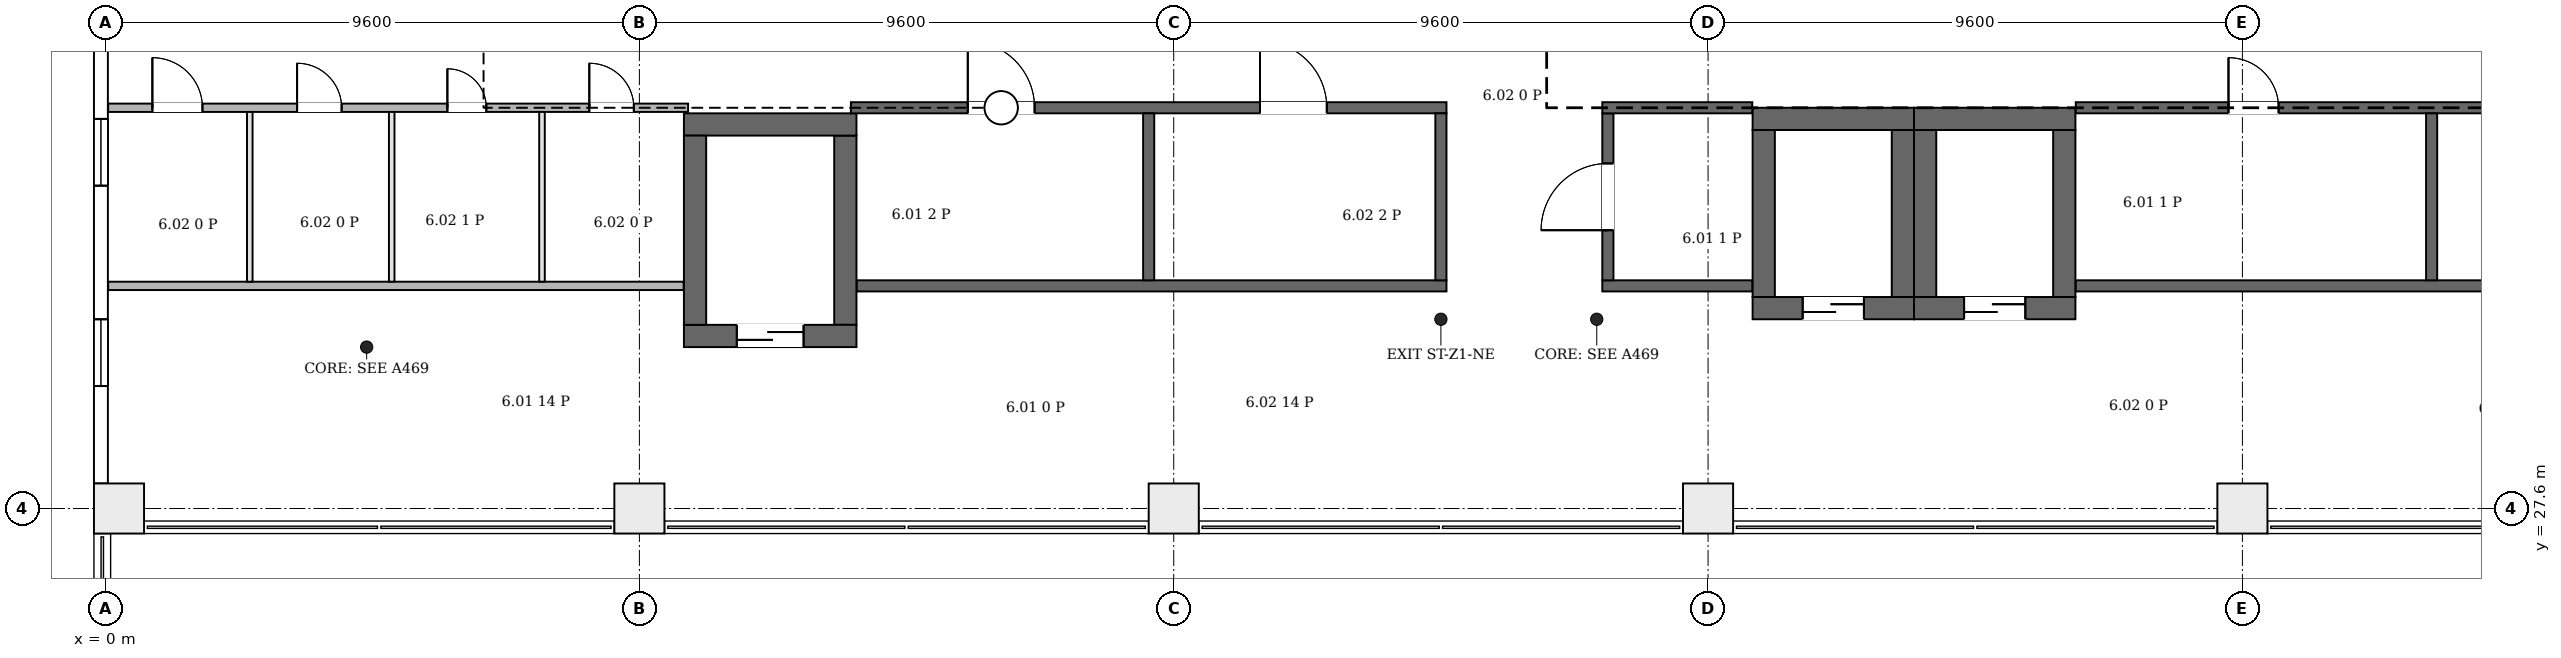
"""IFC4 building model, lengths in metres.
Left out: names, types, materials, properties, quantities, classifications, styles, units other than length and angle.
Written with IfcOpenShell. Run it as: python <this file> out.ifc"""

import sys

from ifc_helpers import new_model, si_unit, direction, frame, frame_2d, origin, origin_2d, place, context, subcontext, project, spatial, rectangle, extrude, element, fill, save


model = new_model("IFC4")
c1 = context("Model", 3, precision=1e-05, world=origin(), true_north=direction((0.0, 1.0)))
c2 = subcontext(c1, "Body", "Model", "MODEL_VIEW")
j1 = project(units=[si_unit("LENGTHUNIT", "METRE"), si_unit("PLANEANGLEUNIT", "RADIAN")], contexts=[c1])
p1 = place(None, origin())
s1 = spatial("IfcSite", under=j1, at=p1, CompositionType="ELEMENT")
p2 = place(p1, origin())
s2 = spatial("IfcBuilding", under=s1, at=p2, CompositionType="ELEMENT")
p3 = place(p2, frame((0.0, 0.0, 36.1)))
s3 = spatial("IfcBuildingStorey", under=s2, at=p3, CompositionType="ELEMENT", Elevation=36.1)
p4 = place(p3, frame((10.4, 30.7, 0.0), z_axis=(0.0, 0.0, 1.0), x_axis=(1.0, 0.0, 0.0)))
e1 = element("IfcWall", 1, at=p4, inside=s3, PredefinedType="SHEAR", context=c2, shape_type="SweptSolid", body=[
    extrude(rectangle(XDim=3.1, YDim=0.4, at=frame_2d((1.55, 0.0))), origin(), (0.0, 0.0, 1.0), 4.2),
])
p5 = place(p4, frame((0.95, 0.0, 0.0)))
e2 = element("IfcOpeningElement", 2, at=p5, cuts=e1, PredefinedType="OPENING", context=c2, shape_type="SweptSolid", body=[
    extrude(rectangle(XDim=1.2, YDim=2.1, at=frame_2d((0.6, 1.05))), frame((0.0, 0.21, 0.0), z_axis=(0.0, -1.0, 0.0), x_axis=(1.0, 0.0, 0.0)), (0.0, 0.0, 1.0), 0.42),
])
p6 = place(p3, frame((10.4, 34.5, 0.0), z_axis=(0.0, 0.0, 1.0), x_axis=(1.0, 0.0, 0.0)))
e3 = element("IfcWall", 3, at=p6, inside=s3, PredefinedType="SHEAR", context=c2, shape_type="SweptSolid", body=[
    extrude(rectangle(XDim=3.1, YDim=0.4, at=frame_2d((1.55, 0.0))), origin(), (0.0, 0.0, 1.0), 4.2),
])
for number, where, z_axis, x_axis in (
    (4, (10.6, 30.9, 0.0), (0.0, 0.0, 1.0), (0.0, 1.0, 0.0)),
    (5, (13.3, 30.9, 0.0), (0.0, 0.0, 1.0), (0.0, 1.0, 0.0)),
):
    element("IfcWall", number, at=place(p3, frame(where, z_axis=z_axis, x_axis=x_axis)), inside=s3, PredefinedType="SHEAR", context=c2, shape_type="SweptSolid", body=[
        extrude(rectangle(XDim=3.4, YDim=0.4, at=frame_2d((1.7, 0.0))), origin(), (0.0, 0.0, 1.0), 4.2),
    ])
p7 = place(p3, frame((29.6, 31.2, 0.0), z_axis=(0.0, 0.0, 1.0), x_axis=(1.0, 0.0, 0.0)))
e6 = element("IfcWall", 6, at=p7, inside=s3, PredefinedType="SHEAR", context=c2, shape_type="SweptSolid", body=[
    extrude(rectangle(XDim=2.9, YDim=0.4, at=frame_2d((1.45, 0.0))), origin(), (0.0, 0.0, 1.0), 4.2),
])
p8 = place(p7, frame((0.9, 0.0, 0.0)))
e7 = element("IfcOpeningElement", 7, at=p8, cuts=e6, PredefinedType="OPENING", context=c2, shape_type="SweptSolid", body=[
    extrude(rectangle(XDim=1.1, YDim=2.1, at=frame_2d((0.55, 1.05))), frame((0.0, 0.21, 0.0), z_axis=(0.0, -1.0, 0.0), x_axis=(1.0, 0.0, 0.0)), (0.0, 0.0, 1.0), 0.42),
])
p9 = place(p3, frame((29.6, 34.6, 0.0), z_axis=(0.0, 0.0, 1.0), x_axis=(1.0, 0.0, 0.0)))
e8 = element("IfcWall", 8, at=p9, inside=s3, PredefinedType="SHEAR", context=c2, shape_type="SweptSolid", body=[
    extrude(rectangle(XDim=2.9, YDim=0.4, at=frame_2d((1.45, 0.0))), origin(), (0.0, 0.0, 1.0), 4.2),
])
for number, where, z_axis, x_axis in (
    (9, (29.8, 31.4, 0.0), (0.0, 0.0, 1.0), (0.0, 1.0, 0.0)),
    (10, (32.3, 31.4, 0.0), (0.0, 0.0, 1.0), (0.0, 1.0, 0.0)),
):
    element("IfcWall", number, at=place(p3, frame(where, z_axis=z_axis, x_axis=x_axis)), inside=s3, PredefinedType="SHEAR", context=c2, shape_type="SweptSolid", body=[
        extrude(rectangle(XDim=3.0, YDim=0.4, at=frame_2d((1.5, 0.0))), origin(), (0.0, 0.0, 1.0), 4.2),
    ])
p10 = place(p3, frame((32.5, 31.2, 0.0), z_axis=(0.0, 0.0, 1.0), x_axis=(1.0, 0.0, 0.0)))
e11 = element("IfcWall", 11, at=p10, inside=s3, PredefinedType="SHEAR", context=c2, shape_type="SweptSolid", body=[
    extrude(rectangle(XDim=2.9, YDim=0.4, at=frame_2d((1.45, 0.0))), origin(), (0.0, 0.0, 1.0), 4.2),
])
p11 = place(p10, frame((0.9, 0.0, 0.0)))
e12 = element("IfcOpeningElement", 12, at=p11, cuts=e11, PredefinedType="OPENING", context=c2, shape_type="SweptSolid", body=[
    extrude(rectangle(XDim=1.1, YDim=2.1, at=frame_2d((0.55, 1.05))), frame((0.0, 0.21, 0.0), z_axis=(0.0, -1.0, 0.0), x_axis=(1.0, 0.0, 0.0)), (0.0, 0.0, 1.0), 0.42),
])
p12 = place(p3, frame((32.5, 34.6, 0.0), z_axis=(0.0, 0.0, 1.0), x_axis=(1.0, 0.0, 0.0)))
e13 = element("IfcWall", 13, at=p12, inside=s3, PredefinedType="SHEAR", context=c2, shape_type="SweptSolid", body=[
    extrude(rectangle(XDim=2.9, YDim=0.4, at=frame_2d((1.45, 0.0))), origin(), (0.0, 0.0, 1.0), 4.2),
])
for number, where, z_axis, x_axis in (
    (14, (32.7, 31.4, 0.0), (0.0, 0.0, 1.0), (0.0, 1.0, 0.0)),
    (15, (35.2, 31.4, 0.0), (0.0, 0.0, 1.0), (0.0, 1.0, 0.0)),
):
    element("IfcWall", number, at=place(p3, frame(where, z_axis=z_axis, x_axis=x_axis)), inside=s3, PredefinedType="SHEAR", context=c2, shape_type="SweptSolid", body=[
        extrude(rectangle(XDim=3.0, YDim=0.4, at=frame_2d((1.5, 0.0))), origin(), (0.0, 0.0, 1.0), 4.2),
    ])
for number, where, z_axis, x_axis in (
    (16, (0.25, 27.6, 0.0), (0.0, 0.0, 1.0), (1.0, 0.0, 0.0)),
    (17, (9.6, 27.6, 0.0), (0.0, 0.0, 1.0), (1.0, 0.0, 0.0)),
    (18, (19.2, 27.6, 0.0), (0.0, 0.0, 1.0), (1.0, 0.0, 0.0)),
    (19, (28.8, 27.6, 0.0), (0.0, 0.0, 1.0), (1.0, 0.0, 0.0)),
    (20, (38.4, 27.6, 0.0), (0.0, 0.0, 1.0), (1.0, 0.0, 0.0)),
):
    element("IfcColumn", number, at=place(p3, frame(where, z_axis=z_axis, x_axis=x_axis)), inside=s3, PredefinedType="COLUMN", context=c2, shape_type="SweptSolid", body=[
        extrude(rectangle(XDim=0.9, YDim=0.9, at=origin_2d()), origin(), (0.0, 0.0, 1.0), 4.2),
    ])
p13 = place(p3, frame((-0.074, 36.35, 0.0), z_axis=(0.0, 0.0, 1.0), x_axis=(0.0, -1.0, 0.0)))
e21 = element("IfcWall", 21, at=p13, inside=s3, PredefinedType="ELEMENTEDWALL", context=c2, shape_type="SweptSolid", body=[
    extrude(rectangle(XDim=8.3, YDim=0.25, at=frame_2d((4.15, 0.0))), origin(), (0.0, 0.0, 1.0), 3.9),
])
p14 = place(p13, frame((5.35, 0.0, 0.9)))
e22 = element("IfcOpeningElement", 22, at=p14, cuts=e21, PredefinedType="OPENING", context=c2, shape_type="SweptSolid", body=[
    extrude(rectangle(XDim=1.2, YDim=2.6, at=frame_2d((0.6, 1.3))), frame((0.0, 0.135, 0.0), z_axis=(0.0, -1.0, 0.0), x_axis=(1.0, 0.0, 0.0)), (0.0, 0.0, 1.0), 0.27),
])
p15 = place(p13, frame((1.75, 0.0, 0.9)))
e23 = element("IfcOpeningElement", 23, at=p15, cuts=e21, PredefinedType="OPENING", context=c2, shape_type="SweptSolid", body=[
    extrude(rectangle(XDim=1.2, YDim=2.6, at=frame_2d((0.6, 1.3))), frame((0.0, 0.135, 0.0), z_axis=(0.0, -1.0, 0.0), x_axis=(1.0, 0.0, 0.0)), (0.0, 0.0, 1.0), 0.27),
])
p16 = place(p3, frame((0.056, 31.6, 0.0), z_axis=(0.0, 0.0, 1.0), x_axis=(1.0, 0.0, 0.0)))
e24 = element("IfcWall", 24, at=p16, inside=s3, PredefinedType="PARTITIONING", context=c2, shape_type="SweptSolid", body=[
    extrude(rectangle(XDim=10.338, YDim=0.15, at=frame_2d((5.169, 0.0))), origin(), (0.0, 0.0, 1.0), 3.9),
])
p17 = place(p3, frame((0.056, 34.8, 0.0), z_axis=(0.0, 0.0, 1.0), x_axis=(1.0, 0.0, 0.0)))
e25 = element("IfcWall", 25, at=p17, inside=s3, PredefinedType="PARTITIONING", context=c2, shape_type="SweptSolid", body=[
    extrude(rectangle(XDim=10.419, YDim=0.15, at=frame_2d((5.209, 0.0))), origin(), (0.0, 0.0, 1.0), 3.9),
])
p18 = place(p17, frame((0.794, 0.0, 0.0)))
e26 = element("IfcOpeningElement", 26, at=p18, cuts=e25, PredefinedType="OPENING", context=c2, shape_type="SweptSolid", body=[
    extrude(rectangle(XDim=0.9, YDim=2.1, at=frame_2d((0.45, 1.05))), frame((0.0, 0.085, 0.0), z_axis=(0.0, -1.0, 0.0), x_axis=(1.0, 0.0, 0.0)), (0.0, 0.0, 1.0), 0.17),
])
p19 = place(p17, frame((3.394, 0.0, 0.0)))
e27 = element("IfcOpeningElement", 27, at=p19, cuts=e25, PredefinedType="OPENING", context=c2, shape_type="SweptSolid", body=[
    extrude(rectangle(XDim=0.8, YDim=2.1, at=frame_2d((0.4, 1.05))), frame((0.0, 0.085, 0.0), z_axis=(0.0, -1.0, 0.0), x_axis=(1.0, 0.0, 0.0)), (0.0, 0.0, 1.0), 0.17),
])
p20 = place(p17, frame((6.094, 0.0, 0.0)))
e28 = element("IfcOpeningElement", 28, at=p20, cuts=e25, PredefinedType="OPENING", context=c2, shape_type="SweptSolid", body=[
    extrude(rectangle(XDim=0.7, YDim=2.1, at=frame_2d((0.35, 1.05))), frame((0.0, 0.085, 0.0), z_axis=(0.0, -1.0, 0.0), x_axis=(1.0, 0.0, 0.0)), (0.0, 0.0, 1.0), 0.17),
])
p21 = place(p17, frame((8.644, 0.0, 0.0)))
e29 = element("IfcOpeningElement", 29, at=p21, cuts=e25, PredefinedType="OPENING", context=c2, shape_type="SweptSolid", body=[
    extrude(rectangle(XDim=0.8, YDim=2.1, at=frame_2d((0.4, 1.05))), frame((0.0, 0.085, 0.0), z_axis=(0.0, -1.0, 0.0), x_axis=(1.0, 0.0, 0.0)), (0.0, 0.0, 1.0), 0.17),
])
for number, where, z_axis, x_axis in (
    (30, (2.6, 31.675, 0.0), (0.0, 0.0, 1.0), (0.0, 1.0, 0.0)),
    (31, (5.15, 31.675, 0.0), (0.0, 0.0, 1.0), (0.0, 1.0, 0.0)),
    (32, (7.85, 31.675, 0.0), (0.0, 0.0, 1.0), (0.0, 1.0, 0.0)),
):
    element("IfcWall", number, at=place(p3, frame(where, z_axis=z_axis, x_axis=x_axis)), inside=s3, PredefinedType="PARTITIONING", context=c2, shape_type="SweptSolid", body=[
        extrude(rectangle(XDim=3.05, YDim=0.1, at=frame_2d((1.525, 0.0))), origin(), (0.0, 0.0, 1.0), 3.9),
    ])
p22 = place(p3, frame((13.4, 34.8, 0.0), z_axis=(0.0, 0.0, 1.0), x_axis=(1.0, 0.0, 0.0)))
e33 = element("IfcWall", 33, at=p22, inside=s3, PredefinedType="PARTITIONING", context=c2, shape_type="SweptSolid", body=[
    extrude(rectangle(XDim=10.7, YDim=0.2, at=frame_2d((5.35, 0.0))), origin(), (0.0, 0.0, 1.0), 3.9),
])
p23 = place(p22, frame((2.1, 0.0, 0.0)))
e34 = element("IfcOpeningElement", 34, at=p23, cuts=e33, PredefinedType="OPENING", context=c2, shape_type="SweptSolid", body=[
    extrude(rectangle(XDim=1.2, YDim=2.1, at=frame_2d((0.6, 1.05))), frame((0.0, 0.11, 0.0), z_axis=(0.0, -1.0, 0.0), x_axis=(1.0, 0.0, 0.0)), (0.0, 0.0, 1.0), 0.22),
])
p24 = place(p22, frame((7.35, 0.0, 0.0)))
e35 = element("IfcOpeningElement", 35, at=p24, cuts=e33, PredefinedType="OPENING", context=c2, shape_type="SweptSolid", body=[
    extrude(rectangle(XDim=1.2, YDim=2.1, at=frame_2d((0.6, 1.05))), frame((0.0, 0.11, 0.0), z_axis=(0.0, -1.0, 0.0), x_axis=(1.0, 0.0, 0.0)), (0.0, 0.0, 1.0), 0.22),
])
p25 = place(p3, frame((13.506, 31.6, 0.0), z_axis=(0.0, 0.0, 1.0), x_axis=(1.0, 0.0, 0.0)))
e36 = element("IfcWall", 36, at=p25, inside=s3, PredefinedType="PARTITIONING", context=c2, shape_type="SweptSolid", body=[
    extrude(rectangle(XDim=10.594, YDim=0.2, at=frame_2d((5.297, 0.0))), origin(), (0.0, 0.0, 1.0), 3.9),
])
for number, where, z_axis, x_axis in (
    (37, (18.75, 31.7, 0.0), (0.0, 0.0, 1.0), (0.0, 1.0, 0.0)),
    (38, (24.0, 31.7, 0.0), (0.0, 0.0, 1.0), (0.0, 1.0, 0.0)),
):
    element("IfcWall", number, at=place(p3, frame(where, z_axis=z_axis, x_axis=x_axis)), inside=s3, PredefinedType="PARTITIONING", context=c2, shape_type="SweptSolid", body=[
        extrude(rectangle(XDim=3.0, YDim=0.2, at=frame_2d((1.5, 0.0))), origin(), (0.0, 0.0, 1.0), 3.9),
    ])
p26 = place(p3, frame((26.9, 31.6, 0.0), z_axis=(0.0, 0.0, 1.0), x_axis=(1.0, 0.0, 0.0)))
e39 = element("IfcWall", 39, at=p26, inside=s3, PredefinedType="PARTITIONING", context=c2, shape_type="SweptSolid", body=[
    extrude(rectangle(XDim=2.694, YDim=0.2, at=frame_2d((1.347, 0.0))), origin(), (0.0, 0.0, 1.0), 3.9),
])
p27 = place(p3, frame((27.0, 31.7, 0.0), z_axis=(0.0, 0.0, 1.0), x_axis=(0.0, 1.0, 0.0)))
e40 = element("IfcWall", 40, at=p27, inside=s3, PredefinedType="PARTITIONING", context=c2, shape_type="SweptSolid", body=[
    extrude(rectangle(XDim=3.0, YDim=0.2, at=frame_2d((1.5, 0.0))), origin(), (0.0, 0.0, 1.0), 3.9),
])
p28 = place(p27, frame((0.9, 0.0, 0.0)))
e41 = element("IfcOpeningElement", 41, at=p28, cuts=e40, PredefinedType="OPENING", context=c2, shape_type="SweptSolid", body=[
    extrude(rectangle(XDim=1.2, YDim=2.1, at=frame_2d((0.6, 1.05))), frame((0.0, 0.11, 0.0), z_axis=(0.0, -1.0, 0.0), x_axis=(1.0, 0.0, 0.0)), (0.0, 0.0, 1.0), 0.22),
])
p29 = place(p3, frame((26.9, 34.8, 0.0), z_axis=(0.0, 0.0, 1.0), x_axis=(1.0, 0.0, 0.0)))
e42 = element("IfcWall", 42, at=p29, inside=s3, PredefinedType="PARTITIONING", context=c2, shape_type="SweptSolid", body=[
    extrude(rectangle(XDim=2.694, YDim=0.2, at=frame_2d((1.347, 0.0))), origin(), (0.0, 0.0, 1.0), 3.9),
])
p30 = place(p3, frame((35.406, 31.6, 0.0), z_axis=(0.0, 0.0, 1.0), x_axis=(1.0, 0.0, 0.0)))
e43 = element("IfcWall", 43, at=p30, inside=s3, PredefinedType="PARTITIONING", context=c2, shape_type="SweptSolid", body=[
    extrude(rectangle(XDim=12.788, YDim=0.2, at=frame_2d((6.394, 0.0))), origin(), (0.0, 0.0, 1.0), 3.9),
])
p31 = place(p3, frame((35.406, 34.8, 0.0), z_axis=(0.0, 0.0, 1.0), x_axis=(1.0, 0.0, 0.0)))
e44 = element("IfcWall", 44, at=p31, inside=s3, PredefinedType="PARTITIONING", context=c2, shape_type="SweptSolid", body=[
    extrude(rectangle(XDim=12.788, YDim=0.2, at=frame_2d((6.394, 0.0))), origin(), (0.0, 0.0, 1.0), 3.9),
])
p32 = place(p31, frame((2.744, 0.0, 0.0)))
e45 = element("IfcOpeningElement", 45, at=p32, cuts=e44, PredefinedType="OPENING", context=c2, shape_type="SweptSolid", body=[
    extrude(rectangle(XDim=0.9, YDim=2.1, at=frame_2d((0.45, 1.05))), frame((0.0, 0.11, 0.0), z_axis=(0.0, -1.0, 0.0), x_axis=(1.0, 0.0, 0.0)), (0.0, 0.0, 1.0), 0.22),
])
p33 = place(p31, frame((9.144, 0.0, 0.0)))
e46 = element("IfcOpeningElement", 46, at=p33, cuts=e44, PredefinedType="OPENING", context=c2, shape_type="SweptSolid", body=[
    extrude(rectangle(XDim=0.9, YDim=2.1, at=frame_2d((0.45, 1.05))), frame((0.0, 0.11, 0.0), z_axis=(0.0, -1.0, 0.0), x_axis=(1.0, 0.0, 0.0)), (0.0, 0.0, 1.0), 0.22),
])
p34 = place(p3, frame((41.8, 31.7, 0.0), z_axis=(0.0, 0.0, 1.0), x_axis=(0.0, 1.0, 0.0)))
e47 = element("IfcWall", 47, at=p34, inside=s3, PredefinedType="PARTITIONING", context=c2, shape_type="SweptSolid", body=[
    extrude(rectangle(XDim=3.0, YDim=0.2, at=frame_2d((1.5, 0.0))), origin(), (0.0, 0.0, 1.0), 3.9),
])
p35 = place(p14, origin())
e48 = element("IfcWindow", 48, at=p35, inside=s3, PartitioningType="SINGLE_PANEL", PredefinedType="WINDOW", context=c2, shape_type="SweptSolid", body=[
    extrude(rectangle(XDim=1.2, YDim=2.6, at=frame_2d((0.6, 1.3))), frame((0.0, 0.03, 0.0), z_axis=(0.0, -1.0, 0.0), x_axis=(1.0, 0.0, 0.0)), (0.0, 0.0, 1.0), 0.06),
])
fill(e22, e48)
p36 = place(p15, origin())
e49 = element("IfcWindow", 49, at=p36, inside=s3, PartitioningType="SINGLE_PANEL", PredefinedType="WINDOW", context=c2, shape_type="SweptSolid", body=[
    extrude(rectangle(XDim=1.2, YDim=2.6, at=frame_2d((0.6, 1.3))), frame((0.0, 0.03, 0.0), z_axis=(0.0, -1.0, 0.0), x_axis=(1.0, 0.0, 0.0)), (0.0, 0.0, 1.0), 0.06),
])
fill(e23, e49)
p37 = place(p5, origin())
e50 = element("IfcDoor", 50, at=p37, inside=s3, OperationType="DOUBLE_DOOR_SLIDING", PredefinedType="DOOR", context=c2, shape_type="SweptSolid", body=[
    extrude(rectangle(XDim=1.2, YDim=2.1, at=frame_2d((0.6, 1.05))), frame((0.0, 0.025, 0.0), z_axis=(0.0, -1.0, 0.0), x_axis=(1.0, 0.0, 0.0)), (0.0, 0.0, 1.0), 0.05),
])
fill(e2, e50)
p38 = place(p8, origin())
e51 = element("IfcDoor", 51, at=p38, inside=s3, OperationType="DOUBLE_DOOR_SLIDING", PredefinedType="DOOR", context=c2, shape_type="SweptSolid", body=[
    extrude(rectangle(XDim=1.1, YDim=2.1, at=frame_2d((0.55, 1.05))), frame((0.0, 0.025, 0.0), z_axis=(0.0, -1.0, 0.0), x_axis=(1.0, 0.0, 0.0)), (0.0, 0.0, 1.0), 0.05),
])
fill(e7, e51)
p39 = place(p11, origin())
e52 = element("IfcDoor", 52, at=p39, inside=s3, OperationType="DOUBLE_DOOR_SLIDING", PredefinedType="DOOR", context=c2, shape_type="SweptSolid", body=[
    extrude(rectangle(XDim=1.1, YDim=2.1, at=frame_2d((0.55, 1.05))), frame((0.0, 0.025, 0.0), z_axis=(0.0, -1.0, 0.0), x_axis=(1.0, 0.0, 0.0)), (0.0, 0.0, 1.0), 0.05),
])
fill(e12, e52)
p40 = place(p18, origin())
e53 = element("IfcDoor", 53, at=p40, inside=s3, OperationType="SINGLE_SWING_LEFT", PredefinedType="DOOR", context=c2, shape_type="SweptSolid", body=[
    extrude(rectangle(XDim=0.9, YDim=2.1, at=frame_2d((0.45, 1.05))), frame((0.0, 0.025, 0.0), z_axis=(0.0, -1.0, 0.0), x_axis=(1.0, 0.0, 0.0)), (0.0, 0.0, 1.0), 0.05),
])
fill(e26, e53)
p41 = place(p19, origin())
e54 = element("IfcDoor", 54, at=p41, inside=s3, OperationType="SINGLE_SWING_LEFT", PredefinedType="DOOR", context=c2, shape_type="SweptSolid", body=[
    extrude(rectangle(XDim=0.8, YDim=2.1, at=frame_2d((0.4, 1.05))), frame((0.0, 0.025, 0.0), z_axis=(0.0, -1.0, 0.0), x_axis=(1.0, 0.0, 0.0)), (0.0, 0.0, 1.0), 0.05),
])
fill(e27, e54)
p42 = place(p20, origin())
e55 = element("IfcDoor", 55, at=p42, inside=s3, OperationType="SINGLE_SWING_LEFT", PredefinedType="DOOR", context=c2, shape_type="SweptSolid", body=[
    extrude(rectangle(XDim=0.7, YDim=2.1, at=frame_2d((0.35, 1.05))), frame((0.0, 0.025, 0.0), z_axis=(0.0, -1.0, 0.0), x_axis=(1.0, 0.0, 0.0)), (0.0, 0.0, 1.0), 0.05),
])
fill(e28, e55)
p43 = place(p21, origin())
e56 = element("IfcDoor", 56, at=p43, inside=s3, OperationType="SINGLE_SWING_LEFT", PredefinedType="DOOR", context=c2, shape_type="SweptSolid", body=[
    extrude(rectangle(XDim=0.8, YDim=2.1, at=frame_2d((0.4, 1.05))), frame((0.0, 0.025, 0.0), z_axis=(0.0, -1.0, 0.0), x_axis=(1.0, 0.0, 0.0)), (0.0, 0.0, 1.0), 0.05),
])
fill(e29, e56)
p44 = place(p23, origin())
e57 = element("IfcDoor", 57, at=p44, inside=s3, OperationType="SINGLE_SWING_RIGHT", PredefinedType="DOOR", context=c2, shape_type="SweptSolid", body=[
    extrude(rectangle(XDim=1.2, YDim=2.1, at=frame_2d((0.6, 1.05))), frame((0.0, 0.025, 0.0), z_axis=(0.0, -1.0, 0.0), x_axis=(1.0, 0.0, 0.0)), (0.0, 0.0, 1.0), 0.05),
])
fill(e34, e57)
p45 = place(p24, origin())
e58 = element("IfcDoor", 58, at=p45, inside=s3, OperationType="SINGLE_SWING_LEFT", PredefinedType="DOOR", context=c2, shape_type="SweptSolid", body=[
    extrude(rectangle(XDim=1.2, YDim=2.1, at=frame_2d((0.6, 1.05))), frame((0.0, 0.025, 0.0), z_axis=(0.0, -1.0, 0.0), x_axis=(1.0, 0.0, 0.0)), (0.0, 0.0, 1.0), 0.05),
])
fill(e35, e58)
p46 = place(p28, origin())
e59 = element("IfcDoor", 59, at=p46, inside=s3, OperationType="SINGLE_SWING_RIGHT", PredefinedType="DOOR", context=c2, shape_type="SweptSolid", body=[
    extrude(rectangle(XDim=1.2, YDim=2.1, at=frame_2d((0.6, 1.05))), frame((0.0, 0.025, 0.0), z_axis=(0.0, -1.0, 0.0), x_axis=(1.0, 0.0, 0.0)), (0.0, 0.0, 1.0), 0.05),
])
fill(e41, e59)
p47 = place(p32, origin())
e60 = element("IfcDoor", 60, at=p47, inside=s3, OperationType="SINGLE_SWING_RIGHT", PredefinedType="DOOR", context=c2, shape_type="SweptSolid", body=[
    extrude(rectangle(XDim=0.9, YDim=2.1, at=frame_2d((0.45, 1.05))), frame((0.0, 0.025, 0.0), z_axis=(0.0, -1.0, 0.0), x_axis=(1.0, 0.0, 0.0)), (0.0, 0.0, 1.0), 0.05),
])
fill(e45, e60)
save(model, sys.argv[1])
